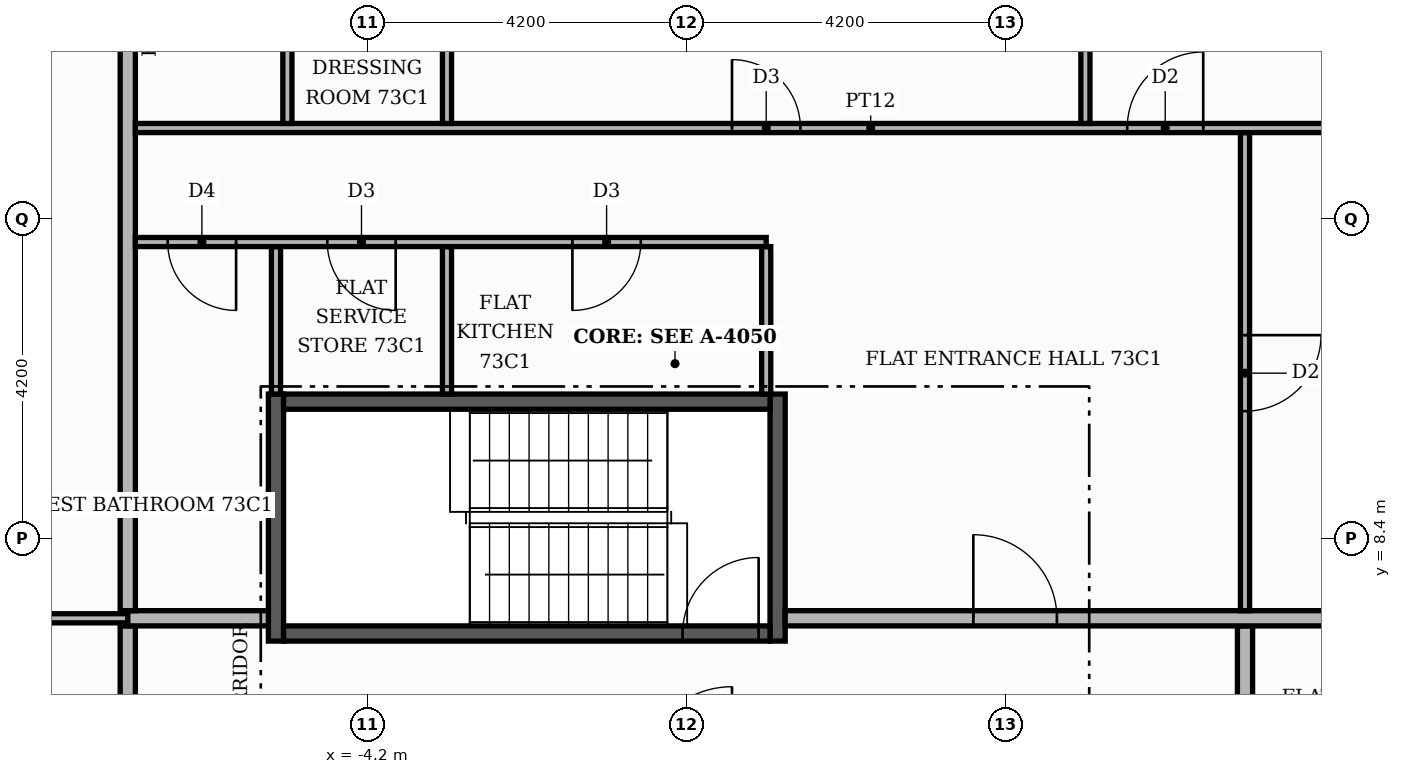
"""IFC4 building model, lengths in metres.
Left out: names, types, materials, properties, quantities, classifications, styles, units other than length and angle.
Written with IfcOpenShell. Run it as: python <this file> out.ifc"""

import sys

from ifc_helpers import new_model, si_unit, direction, frame, frame_2d, origin, place, context, subcontext, project, spatial, rectangle, extrude, element, fill, save


model = new_model("IFC4")
c1 = context("Model", 3, precision=1e-05, world=origin(), true_north=direction((0.0, 1.0)))
c2 = subcontext(c1, "Body", "Model", "MODEL_VIEW")
j1 = project(units=[si_unit("LENGTHUNIT", "METRE"), si_unit("PLANEANGLEUNIT", "RADIAN")], contexts=[c1])
p1 = place(None, origin())
s1 = spatial("IfcSite", under=j1, at=p1, CompositionType="ELEMENT")
p2 = place(p1, origin())
s2 = spatial("IfcBuilding", under=s1, at=p2, CompositionType="ELEMENT")
p3 = place(p2, frame((0.0, 0.0, 304.5)))
s3 = spatial("IfcBuildingStorey", under=s2, at=p3, CompositionType="ELEMENT", Elevation=304.5)
for number, where, z_axis, x_axis in (
    (1, (-5.4, 7.05, 0.0), (0.0, 0.0, 1.0), (0.0, 1.0, 0.0)),
    (2, (1.2, 7.05, 0.0), (0.0, 0.0, 1.0), (0.0, 1.0, 0.0)),
):
    element("IfcWall", number, at=place(p3, frame(where, z_axis=z_axis, x_axis=x_axis)), inside=s3, PredefinedType="SHEAR", context=c2, shape_type="SweptSolid", body=[
        extrude(rectangle(XDim=3.25, YDim=0.2, at=frame_2d((1.625, 0.0))), origin(), (0.0, 0.0, 1.0), 3.55),
    ])
p4 = place(p3, frame((-5.3, 7.15, 0.0), z_axis=(0.0, 0.0, 1.0), x_axis=(1.0, 0.0, 0.0)))
e3 = element("IfcWall", 3, at=p4, inside=s3, PredefinedType="SHEAR", context=c2, shape_type="SweptSolid", body=[
    extrude(rectangle(XDim=6.4, YDim=0.2, at=frame_2d((3.2, 0.0))), origin(), (0.0, 0.0, 1.0), 3.55),
])
p5 = place(p4, frame((5.25, 0.0, 0.0)))
e4 = element("IfcOpeningElement", 4, at=p5, cuts=e3, PredefinedType="OPENING", context=c2, shape_type="SweptSolid", body=[
    extrude(rectangle(XDim=1.0, YDim=2.1, at=frame_2d((0.5, 1.05))), frame((0.0, 0.11, 0.0), z_axis=(0.0, -1.0, 0.0), x_axis=(1.0, 0.0, 0.0)), (0.0, 0.0, 1.0), 0.22),
])
p6 = place(p3, frame((-5.3, 10.2, 0.0), z_axis=(0.0, 0.0, 1.0), x_axis=(1.0, 0.0, 0.0)))
e5 = element("IfcWall", 5, at=p6, inside=s3, PredefinedType="SHEAR", context=c2, shape_type="SweptSolid", body=[
    extrude(rectangle(XDim=6.4, YDim=0.2, at=frame_2d((3.2, 0.0))), origin(), (0.0, 0.0, 1.0), 3.55),
])
p7 = place(p3, frame((-7.35, -7.25, 0.0), z_axis=(0.0, 0.0, 1.0), x_axis=(0.0, 1.0, 0.0)))
e6 = element("IfcWall", 6, at=p7, inside=s3, PredefinedType="PARTITIONING", context=c2, shape_type="SweptSolid", body=[
    extrude(rectangle(XDim=14.5, YDim=0.2, at=frame_2d((7.25, 0.0))), origin(), (0.0, 0.0, 1.0), 3.55),
])
p8 = place(p7, frame((10.9, 0.0, 0.0)))
e7 = element("IfcOpeningElement", 7, at=p8, cuts=e6, PredefinedType="OPENING", context=c2, shape_type="SweptSolid", body=[
    extrude(rectangle(XDim=1.1, YDim=2.4, at=frame_2d((0.55, 1.2))), frame((0.0, 0.11, 0.0), z_axis=(0.0, -1.0, 0.0), x_axis=(1.0, 0.0, 0.0)), (0.0, 0.0, 1.0), 0.22),
])
p9 = place(p3, frame((7.35, -7.25, 0.0), z_axis=(0.0, 0.0, 1.0), x_axis=(0.0, 1.0, 0.0)))
e8 = element("IfcWall", 8, at=p9, inside=s3, PredefinedType="PARTITIONING", context=c2, shape_type="SweptSolid", body=[
    extrude(rectangle(XDim=14.5, YDim=0.2, at=frame_2d((7.25, 0.0))), origin(), (0.0, 0.0, 1.0), 3.55),
])
p10 = place(p9, frame((1.45, 0.0, 0.0)))
e9 = element("IfcOpeningElement", 9, at=p10, cuts=e8, PredefinedType="OPENING", context=c2, shape_type="SweptSolid", body=[
    extrude(rectangle(XDim=1.1, YDim=2.4, at=frame_2d((0.55, 1.2))), frame((0.0, 0.11, 0.0), z_axis=(0.0, -1.0, 0.0), x_axis=(1.0, 0.0, 0.0)), (0.0, 0.0, 1.0), 0.22),
])
p11 = place(p3, frame((-13.2, 7.35, 0.0), z_axis=(0.0, 0.0, 1.0), x_axis=(1.0, 0.0, 0.0)))
e10 = element("IfcWall", 10, at=p11, inside=s3, PredefinedType="PARTITIONING", context=c2, shape_type="SweptSolid", body=[
    extrude(rectangle(XDim=5.85, YDim=0.12, at=frame_2d((2.925, 0.0))), origin(), (0.0, 0.0, 1.0), 3.55),
])
p12 = place(p11, frame((2.475, 0.0, 0.0)))
e11 = element("IfcOpeningElement", 11, at=p12, cuts=e10, PredefinedType="OPENING", context=c2, shape_type="SweptSolid", body=[
    extrude(rectangle(XDim=0.9, YDim=2.1, at=frame_2d((0.45, 1.05))), frame((0.0, 0.07, 0.0), z_axis=(0.0, -1.0, 0.0), x_axis=(1.0, 0.0, 0.0)), (0.0, 0.0, 1.0), 0.14),
])
p13 = place(p3, frame((-7.35, 7.35, 0.0), z_axis=(0.0, 0.0, 1.0), x_axis=(1.0, 0.0, 0.0)))
e12 = element("IfcWall", 12, at=p13, inside=s3, PredefinedType="PARTITIONING", context=c2, shape_type="SweptSolid", body=[
    extrude(rectangle(XDim=1.85, YDim=0.2, at=frame_2d((0.925, 0.0))), origin(), (0.0, 0.0, 1.0), 3.55),
])
p14 = place(p3, frame((1.3, 7.35, 0.0), z_axis=(0.0, 0.0, 1.0), x_axis=(1.0, 0.0, 0.0)))
e13 = element("IfcWall", 13, at=p14, inside=s3, PredefinedType="PARTITIONING", context=c2, shape_type="SweptSolid", body=[
    extrude(rectangle(XDim=17.2, YDim=0.2, at=frame_2d((8.6, 0.0))), origin(), (0.0, 0.0, 1.0), 3.55),
])
p15 = place(p14, frame((2.475, 0.0, 0.0)))
e14 = element("IfcOpeningElement", 14, at=p15, cuts=e13, PredefinedType="OPENING", context=c2, shape_type="SweptSolid", body=[
    extrude(rectangle(XDim=1.1, YDim=2.4, at=frame_2d((0.55, 1.2))), frame((0.0, 0.11, 0.0), z_axis=(0.0, -1.0, 0.0), x_axis=(1.0, 0.0, 0.0)), (0.0, 0.0, 1.0), 0.22),
])
p16 = place(p3, frame((-7.35, 7.45, 0.0), z_axis=(0.0, 0.0, 1.0), x_axis=(0.0, 1.0, 0.0)))
e15 = element("IfcWall", 15, at=p16, inside=s3, PredefinedType="PARTITIONING", context=c2, shape_type="SweptSolid", body=[
    extrude(rectangle(XDim=11.05, YDim=0.2, at=frame_2d((5.525, 0.0))), origin(), (0.0, 0.0, 1.0), 3.55),
])
p17 = place(p3, frame((7.35, 7.45, 0.0), z_axis=(0.0, 0.0, 1.0), x_axis=(0.0, 1.0, 0.0)))
e16 = element("IfcWall", 16, at=p17, inside=s3, PredefinedType="PARTITIONING", context=c2, shape_type="SweptSolid", body=[
    extrude(rectangle(XDim=6.29, YDim=0.12, at=frame_2d((3.145, 0.0))), origin(), (0.0, 0.0, 1.0), 3.55),
])
p18 = place(p17, frame((2.625, 0.0, 0.0)))
e17 = element("IfcOpeningElement", 17, at=p18, cuts=e16, PredefinedType="OPENING", context=c2, shape_type="SweptSolid", body=[
    extrude(rectangle(XDim=1.0, YDim=2.1, at=frame_2d((0.5, 1.05))), frame((0.0, 0.07, 0.0), z_axis=(0.0, -1.0, 0.0), x_axis=(1.0, 0.0, 0.0)), (0.0, 0.0, 1.0), 0.14),
])
for number, where, z_axis, x_axis in (
    (18, (-5.4, 10.3, 0.0), (0.0, 0.0, 1.0), (0.0, 1.0, 0.0)),
    (19, (-3.15, 10.3, 0.0), (0.0, 0.0, 1.0), (0.0, 1.0, 0.0)),
    (20, (1.05, 10.3, 0.0), (0.0, 0.0, 1.0), (0.0, 1.0, 0.0)),
):
    element("IfcWall", number, at=place(p3, frame(where, z_axis=z_axis, x_axis=x_axis)), inside=s3, PredefinedType="PARTITIONING", context=c2, shape_type="SweptSolid", body=[
        extrude(rectangle(XDim=1.94, YDim=0.12, at=frame_2d((0.97, 0.0))), origin(), (0.0, 0.0, 1.0), 3.55),
    ])
p19 = place(p3, frame((-7.25, 12.3, 0.0), z_axis=(0.0, 0.0, 1.0), x_axis=(1.0, 0.0, 0.0)))
e21 = element("IfcWall", 21, at=p19, inside=s3, PredefinedType="PARTITIONING", context=c2, shape_type="SweptSolid", body=[
    extrude(rectangle(XDim=8.3, YDim=0.12, at=frame_2d((4.15, 0.0))), origin(), (0.0, 0.0, 1.0), 3.55),
])
p20 = place(p19, frame((5.75, 0.0, 0.0)))
e22 = element("IfcOpeningElement", 22, at=p20, cuts=e21, PredefinedType="OPENING", context=c2, shape_type="SweptSolid", body=[
    extrude(rectangle(XDim=0.9, YDim=2.1, at=frame_2d((0.45, 1.05))), frame((0.0, 0.07, 0.0), z_axis=(0.0, -1.0, 0.0), x_axis=(1.0, 0.0, 0.0)), (0.0, 0.0, 1.0), 0.14),
])
p21 = place(p19, frame((2.525, 0.0, 0.0)))
e23 = element("IfcOpeningElement", 23, at=p21, cuts=e21, PredefinedType="OPENING", context=c2, shape_type="SweptSolid", body=[
    extrude(rectangle(XDim=0.9, YDim=2.1, at=frame_2d((0.45, 1.05))), frame((0.0, 0.07, 0.0), z_axis=(0.0, -1.0, 0.0), x_axis=(1.0, 0.0, 0.0)), (0.0, 0.0, 1.0), 0.14),
])
p22 = place(p19, frame((0.425, 0.0, 0.0)))
e24 = element("IfcOpeningElement", 24, at=p22, cuts=e21, PredefinedType="OPENING", context=c2, shape_type="SweptSolid", body=[
    extrude(rectangle(XDim=0.9, YDim=2.1, at=frame_2d((0.45, 1.05))), frame((0.0, 0.07, 0.0), z_axis=(0.0, -1.0, 0.0), x_axis=(1.0, 0.0, 0.0)), (0.0, 0.0, 1.0), 0.14),
])
p23 = place(p3, frame((-7.25, 13.8, 0.0), z_axis=(0.0, 0.0, 1.0), x_axis=(1.0, 0.0, 0.0)))
e25 = element("IfcWall", 25, at=p23, inside=s3, PredefinedType="PARTITIONING", context=c2, shape_type="SweptSolid", body=[
    extrude(rectangle(XDim=19.349, YDim=0.12, at=frame_2d((9.675, 0.0))), origin(), (0.0, 0.0, 1.0), 3.55),
])
p24 = place(p23, frame((13.05, 0.0, 0.0)))
e26 = element("IfcOpeningElement", 26, at=p24, cuts=e25, PredefinedType="OPENING", context=c2, shape_type="SweptSolid", body=[
    extrude(rectangle(XDim=1.0, YDim=2.1, at=frame_2d((0.5, 1.05))), frame((0.0, 0.07, 0.0), z_axis=(0.0, -1.0, 0.0), x_axis=(1.0, 0.0, 0.0)), (0.0, 0.0, 1.0), 0.14),
])
p25 = place(p23, frame((7.85, 0.0, 0.0)))
e27 = element("IfcOpeningElement", 27, at=p25, cuts=e25, PredefinedType="OPENING", context=c2, shape_type="SweptSolid", body=[
    extrude(rectangle(XDim=0.9, YDim=2.1, at=frame_2d((0.45, 1.05))), frame((0.0, 0.07, 0.0), z_axis=(0.0, -1.0, 0.0), x_axis=(1.0, 0.0, 0.0)), (0.0, 0.0, 1.0), 0.14),
])
p26 = place(p3, frame((-5.25, 13.86, 0.0), z_axis=(0.0, 0.0, 1.0), x_axis=(0.0, 1.0, 0.0)))
e28 = element("IfcWall", 28, at=p26, inside=s3, PredefinedType="PARTITIONING", context=c2, shape_type="SweptSolid", body=[
    extrude(rectangle(XDim=4.64, YDim=0.12, at=frame_2d((2.32, 0.0))), origin(), (0.0, 0.0, 1.0), 3.55),
])
p27 = place(p26, frame((1.99, 0.0, 0.0)))
e29 = element("IfcOpeningElement", 29, at=p27, cuts=e28, PredefinedType="OPENING", context=c2, shape_type="SweptSolid", body=[
    extrude(rectangle(XDim=0.9, YDim=2.1, at=frame_2d((0.45, 1.05))), frame((0.0, 0.07, 0.0), z_axis=(0.0, -1.0, 0.0), x_axis=(1.0, 0.0, 0.0)), (0.0, 0.0, 1.0), 0.14),
])
p28 = place(p3, frame((-3.15, 13.86, 0.0), z_axis=(0.0, 0.0, 1.0), x_axis=(0.0, 1.0, 0.0)))
e30 = element("IfcWall", 30, at=p28, inside=s3, PredefinedType="PARTITIONING", context=c2, shape_type="SweptSolid", body=[
    extrude(rectangle(XDim=4.64, YDim=0.12, at=frame_2d((2.32, 0.0))), origin(), (0.0, 0.0, 1.0), 3.55),
])
p29 = place(p28, frame((1.99, 0.0, 0.0)))
e31 = element("IfcOpeningElement", 31, at=p29, cuts=e30, PredefinedType="OPENING", context=c2, shape_type="SweptSolid", body=[
    extrude(rectangle(XDim=0.9, YDim=2.1, at=frame_2d((0.45, 1.05))), frame((0.0, 0.07, 0.0), z_axis=(0.0, -1.0, 0.0), x_axis=(1.0, 0.0, 0.0)), (0.0, 0.0, 1.0), 0.14),
])
p30 = place(p3, frame((5.25, 13.86, 0.0), z_axis=(0.0, 0.0, 1.0), x_axis=(0.0, 1.0, 0.0)))
e32 = element("IfcWall", 32, at=p30, inside=s3, PredefinedType="PARTITIONING", context=c2, shape_type="SweptSolid", body=[
    extrude(rectangle(XDim=4.64, YDim=0.12, at=frame_2d((2.32, 0.0))), origin(), (0.0, 0.0, 1.0), 3.55),
])
p31 = place(p5, origin())
e33 = element("IfcDoor", 33, at=p31, inside=s3, OperationType="SINGLE_SWING_RIGHT", PredefinedType="DOOR", context=c2, shape_type="SweptSolid", body=[
    extrude(rectangle(XDim=1.0, YDim=2.1, at=frame_2d((0.5, 1.05))), frame((0.0, 0.025, 0.0), z_axis=(0.0, -1.0, 0.0), x_axis=(1.0, 0.0, 0.0)), (0.0, 0.0, 1.0), 0.05),
])
fill(e4, e33)
p32 = place(p15, origin())
e34 = element("IfcDoor", 34, at=p32, inside=s3, OperationType="SINGLE_SWING_LEFT", PredefinedType="DOOR", context=c2, shape_type="SweptSolid", body=[
    extrude(rectangle(XDim=1.1, YDim=2.4, at=frame_2d((0.55, 1.2))), frame((0.0, 0.025, 0.0), z_axis=(0.0, -1.0, 0.0), x_axis=(1.0, 0.0, 0.0)), (0.0, 0.0, 1.0), 0.05),
])
fill(e14, e34)
p33 = place(p18, frame((1.0, 0.0, 0.0), z_axis=(0.0, 0.0, 1.0), x_axis=(-1.0, 0.0, 0.0)))
e35 = element("IfcDoor", 35, at=p33, inside=s3, OperationType="SINGLE_SWING_RIGHT", PredefinedType="DOOR", context=c2, shape_type="SweptSolid", body=[
    extrude(rectangle(XDim=1.0, YDim=2.1, at=frame_2d((0.5, 1.05))), frame((0.0, 0.025, 0.0), z_axis=(0.0, -1.0, 0.0), x_axis=(1.0, 0.0, 0.0)), (0.0, 0.0, 1.0), 0.05),
])
fill(e17, e35)
p34 = place(p20, frame((0.9, 0.0, 0.0), z_axis=(0.0, 0.0, 1.0), x_axis=(-1.0, 0.0, 0.0)))
e36 = element("IfcDoor", 36, at=p34, inside=s3, OperationType="SINGLE_SWING_LEFT", PredefinedType="DOOR", context=c2, shape_type="SweptSolid", body=[
    extrude(rectangle(XDim=0.9, YDim=2.1, at=frame_2d((0.45, 1.05))), frame((0.0, 0.025, 0.0), z_axis=(0.0, -1.0, 0.0), x_axis=(1.0, 0.0, 0.0)), (0.0, 0.0, 1.0), 0.05),
])
fill(e22, e36)
p35 = place(p21, frame((0.9, 0.0, 0.0), z_axis=(0.0, 0.0, 1.0), x_axis=(-1.0, 0.0, 0.0)))
e37 = element("IfcDoor", 37, at=p35, inside=s3, OperationType="SINGLE_SWING_RIGHT", PredefinedType="DOOR", context=c2, shape_type="SweptSolid", body=[
    extrude(rectangle(XDim=0.9, YDim=2.1, at=frame_2d((0.45, 1.05))), frame((0.0, 0.025, 0.0), z_axis=(0.0, -1.0, 0.0), x_axis=(1.0, 0.0, 0.0)), (0.0, 0.0, 1.0), 0.05),
])
fill(e23, e37)
p36 = place(p22, frame((0.9, 0.0, 0.0), z_axis=(0.0, 0.0, 1.0), x_axis=(-1.0, 0.0, 0.0)))
e38 = element("IfcDoor", 38, at=p36, inside=s3, OperationType="SINGLE_SWING_RIGHT", PredefinedType="DOOR", context=c2, shape_type="SweptSolid", body=[
    extrude(rectangle(XDim=0.9, YDim=2.1, at=frame_2d((0.45, 1.05))), frame((0.0, 0.025, 0.0), z_axis=(0.0, -1.0, 0.0), x_axis=(1.0, 0.0, 0.0)), (0.0, 0.0, 1.0), 0.05),
])
fill(e24, e38)
p37 = place(p24, origin())
e39 = element("IfcDoor", 39, at=p37, inside=s3, OperationType="SINGLE_SWING_RIGHT", PredefinedType="DOOR", context=c2, shape_type="SweptSolid", body=[
    extrude(rectangle(XDim=1.0, YDim=2.1, at=frame_2d((0.5, 1.05))), frame((0.0, 0.025, 0.0), z_axis=(0.0, -1.0, 0.0), x_axis=(1.0, 0.0, 0.0)), (0.0, 0.0, 1.0), 0.05),
])
fill(e26, e39)
p38 = place(p25, origin())
e40 = element("IfcDoor", 40, at=p38, inside=s3, OperationType="SINGLE_SWING_LEFT", PredefinedType="DOOR", context=c2, shape_type="SweptSolid", body=[
    extrude(rectangle(XDim=0.9, YDim=2.1, at=frame_2d((0.45, 1.05))), frame((0.0, 0.025, 0.0), z_axis=(0.0, -1.0, 0.0), x_axis=(1.0, 0.0, 0.0)), (0.0, 0.0, 1.0), 0.05),
])
fill(e27, e40)
save(model, sys.argv[1])
